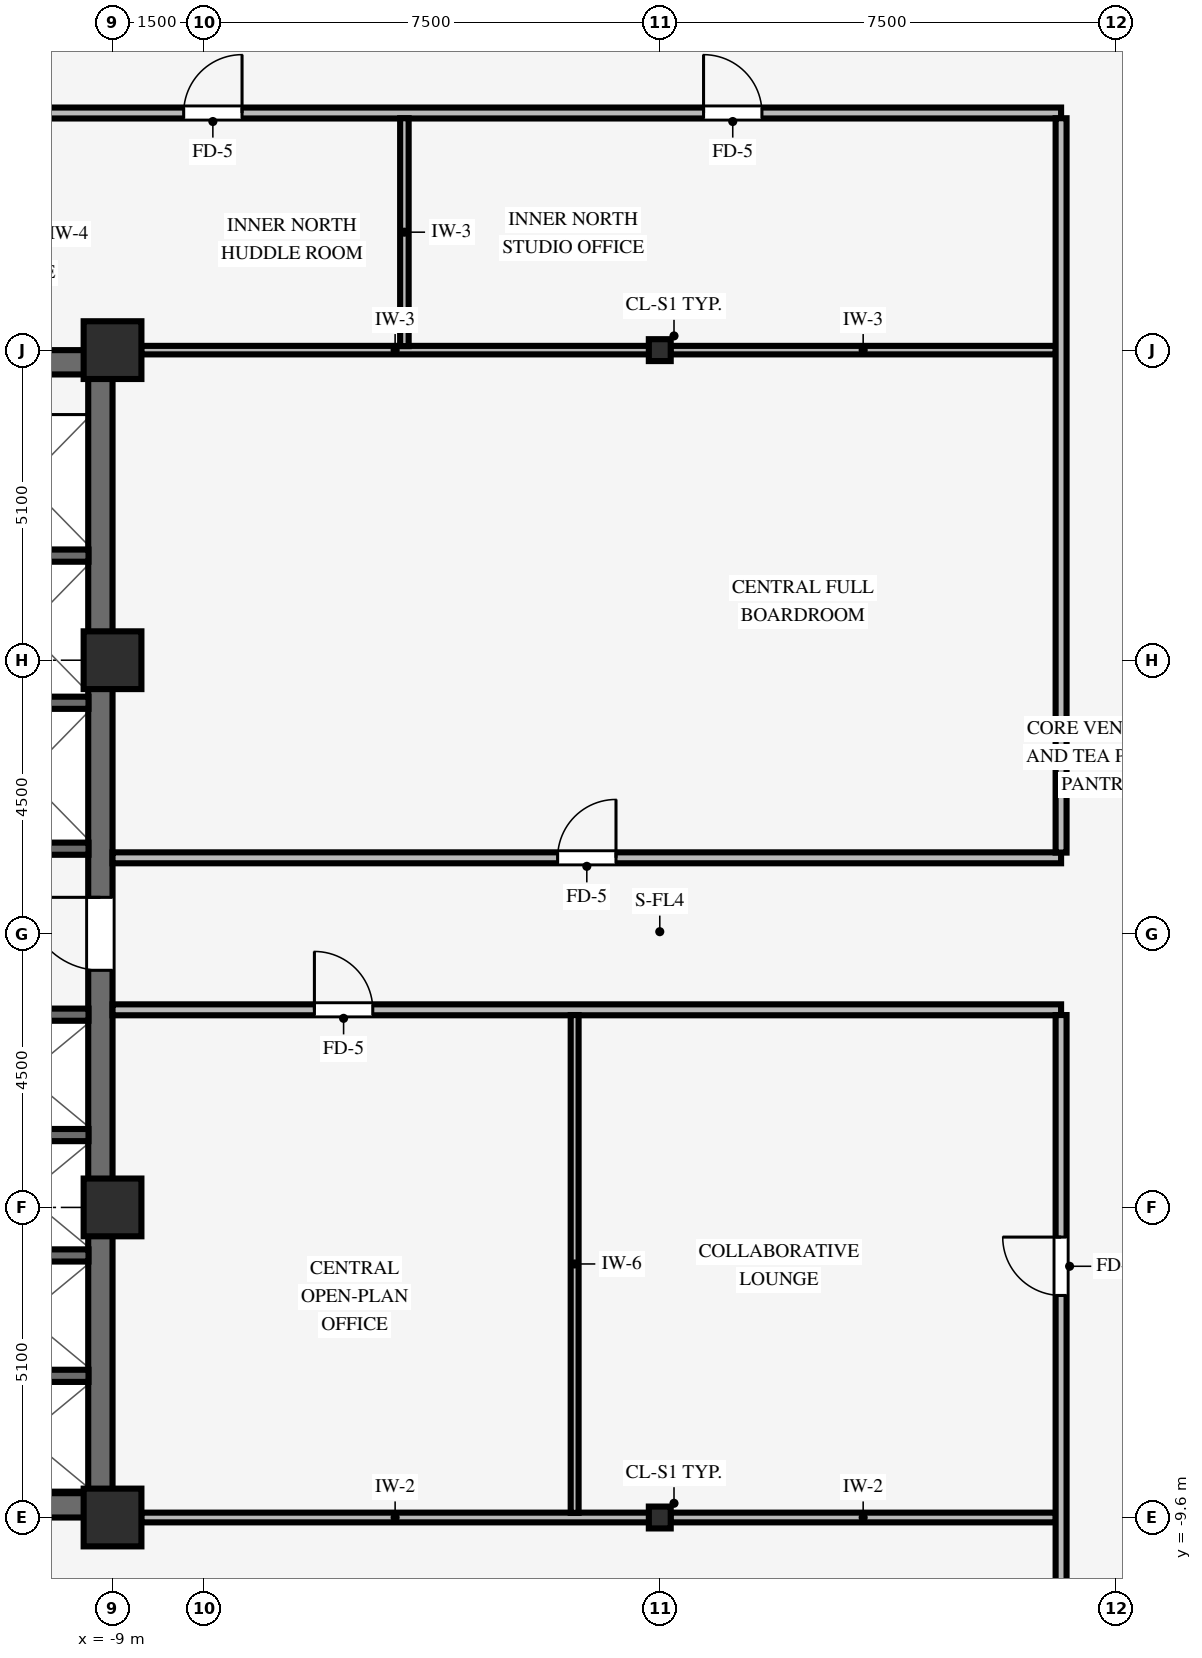
"""IFC4 building model, lengths in metres.
Left out: names, types, materials, properties, quantities, classifications, styles, units other than length and angle.
Written with IfcOpenShell. Run it as: python <this file> out.ifc"""

import sys

from ifc_helpers import new_model, si_unit, direction, frame, frame_2d, origin, origin_2d, place, context, subcontext, project, spatial, rectangle, i_section, extrude, source, transform, mapped, element, fill, save


model = new_model("IFC4")
c1 = context("Model", 3, precision=1e-05, world=origin(), true_north=direction((0.0, 1.0)))
c2 = subcontext(c1, "Body", "Model", "MODEL_VIEW")
j1 = project(units=[si_unit("LENGTHUNIT", "METRE"), si_unit("PLANEANGLEUNIT", "RADIAN")], contexts=[c1])
p1 = place(None, origin())
s1 = spatial("IfcSite", under=j1, at=p1, CompositionType="ELEMENT")
p2 = place(p1, origin())
s2 = spatial("IfcBuilding", under=s1, at=p2, CompositionType="ELEMENT")
p3 = place(p2, frame((0.0, 0.0, 123.85)))
s3 = spatial("IfcBuildingStorey", under=s2, at=p3, CompositionType="ELEMENT", Elevation=123.85)
for number, where, z_axis, x_axis in (
    (1, (-17.5, -9.4, 0.0), (0.0, 0.0, 1.0), (1.0, 0.0, 0.0)),
    (2, (-17.5, 9.4, 0.0), (0.0, 0.0, 1.0), (1.0, 0.0, 0.0)),
):
    element("IfcWall", number, at=place(p3, frame(where, z_axis=z_axis, x_axis=x_axis)), inside=s3, PredefinedType="SHEAR", context=c2, shape_type="SweptSolid", body=[
        extrude(rectangle(XDim=8.5, YDim=0.4, at=frame_2d((4.25, 0.0))), origin(), (0.0, 0.0, 1.0), 3.37),
    ])
p4 = place(p3, frame((-9.2, -9.205, 0.0), z_axis=(0.0, 0.0, 1.0), x_axis=(0.0, 1.0, 0.0)))
e3 = element("IfcWall", 3, at=p4, inside=s3, PredefinedType="SHEAR", context=c2, shape_type="SweptSolid", body=[
    extrude(rectangle(XDim=18.41, YDim=0.4, at=frame_2d((9.205, 0.0))), origin(), (0.0, 0.0, 1.0), 3.37),
])
p5 = place(p4, frame((8.605, 0.0, 0.0)))
e4 = element("IfcOpeningElement", 4, at=p5, cuts=e3, PredefinedType="OPENING", context=c2, shape_type="SweptSolid", body=[
    extrude(rectangle(XDim=1.2, YDim=2.15, at=frame_2d((0.6, 1.075))), frame((0.0, 0.21, 0.0), z_axis=(0.0, -1.0, 0.0), x_axis=(1.0, 0.0, 0.0)), (0.0, 0.0, 1.0), 0.42),
])
for number, where, z_axis, x_axis in (
    (5, (-9.0, -9.6, 0.0), (0.0, 0.0, 1.0), (1.0, 0.0, 0.0)),
    (6, (-9.0, -4.5, 0.0), (0.0, 0.0, 1.0), (1.0, 0.0, 0.0)),
    (7, (-9.0, 4.5, 0.0), (0.0, 0.0, 1.0), (1.0, 0.0, 0.0)),
    (8, (-9.0, 9.6, 0.0), (0.0, 0.0, 1.0), (1.0, 0.0, 0.0)),
):
    element("IfcColumn", number, at=place(p3, frame(where, z_axis=z_axis, x_axis=x_axis)), inside=s3, PredefinedType="COLUMN", context=c2, shape_type="SweptSolid", body=[
        extrude(rectangle(XDim=0.95, YDim=0.95, at=origin_2d()), origin(), (0.0, 0.0, 1.0), 3.37),
    ])
for number, where, z_axis, x_axis in (
    (9, (0.0, -9.6, 0.0), (0.0, 0.0, 1.0), (1.0, 0.0, 0.0)),
    (10, (0.0, 9.6, 0.0), (0.0, 0.0, 1.0), (1.0, 0.0, 0.0)),
):
    element("IfcColumn", number, at=place(p3, frame(where, z_axis=z_axis, x_axis=x_axis)), inside=s3, PredefinedType="COLUMN", context=c2, shape_type="SweptSolid", body=[
        extrude(i_section(OverallWidth=0.36, OverallDepth=0.36, WebThickness=0.021, FlangeThickness=0.021, FilletRadius=0.018, at=origin_2d()), origin(), (0.0, 0.0, 1.0), 3.37),
    ])
for number, where, z_axis, x_axis in (
    (11, (-11.505, -7.27, 0.0), (0.0, 0.0, 1.0), (1.0, 0.0, 0.0)),
    (12, (-11.505, -5.29, 0.0), (0.0, 0.0, 1.0), (1.0, 0.0, 0.0)),
    (13, (-11.505, -3.31, 0.0), (0.0, 0.0, 1.0), (1.0, 0.0, 0.0)),
    (14, (-11.505, -1.33, 0.0), (0.0, 0.0, 1.0), (1.0, 0.0, 0.0)),
    (15, (-11.505, 1.4, 0.0), (0.0, 0.0, 1.0), (1.0, 0.0, 0.0)),
    (16, (-11.505, 3.8, 0.0), (0.0, 0.0, 1.0), (1.0, 0.0, 0.0)),
    (17, (-11.505, 6.22, 0.0), (0.0, 0.0, 1.0), (1.0, 0.0, 0.0)),
):
    element("IfcWall", number, at=place(p3, frame(where, z_axis=z_axis, x_axis=x_axis)), inside=s3, PredefinedType="SHEAR", context=c2, shape_type="SweptSolid", body=[
        extrude(rectangle(XDim=2.11, YDim=0.2, at=frame_2d((1.055, 0.0))), origin(), (0.0, 0.0, 1.0), 3.37),
    ])
p6 = place(p3, frame((-8.529, -9.6, 0.0), z_axis=(0.0, 0.0, 1.0), x_axis=(1.0, 0.0, 0.0)))
e18 = element("IfcWall", 18, at=p6, inside=s3, PredefinedType="PARTITIONING", context=c2, shape_type="SweptSolid", body=[
    extrude(rectangle(XDim=8.353, YDim=0.16, at=frame_2d((4.177, 0.0))), origin(), (0.0, 0.0, 1.0), 2.405),
])
p7 = place(p3, frame((0.176, -9.6, 0.0), z_axis=(0.0, 0.0, 1.0), x_axis=(1.0, 0.0, 0.0)))
e19 = element("IfcWall", 19, at=p7, inside=s3, PredefinedType="PARTITIONING", context=c2, shape_type="SweptSolid", body=[
    extrude(rectangle(XDim=6.338, YDim=0.16, at=frame_2d((3.169, 0.0))), origin(), (0.0, 0.0, 1.0), 2.405),
])
p8 = place(p3, frame((-9.0, -1.25, 0.0), z_axis=(0.0, 0.0, 1.0), x_axis=(1.0, 0.0, 0.0)))
e20 = element("IfcWall", 20, at=p8, inside=s3, PredefinedType="PARTITIONING", context=c2, shape_type="SweptSolid", body=[
    extrude(rectangle(XDim=15.6, YDim=0.18, at=frame_2d((7.8, 0.0))), origin(), (0.0, 0.0, 1.0), 3.36),
])
p9 = place(p8, frame((3.32, 0.0, 0.0)))
e21 = element("IfcOpeningElement", 21, at=p9, cuts=e20, PredefinedType="OPENING", context=c2, shape_type="SweptSolid", body=[
    extrude(rectangle(XDim=0.96, YDim=2.1, at=frame_2d((0.48, 1.05))), frame((0.0, 0.1, 0.0), z_axis=(0.0, -1.0, 0.0), x_axis=(1.0, 0.0, 0.0)), (0.0, 0.0, 1.0), 0.2),
])
p10 = place(p3, frame((-9.0, 1.25, 0.0), z_axis=(0.0, 0.0, 1.0), x_axis=(1.0, 0.0, 0.0)))
e22 = element("IfcWall", 22, at=p10, inside=s3, PredefinedType="PARTITIONING", context=c2, shape_type="SweptSolid", body=[
    extrude(rectangle(XDim=15.6, YDim=0.18, at=frame_2d((7.8, 0.0))), origin(), (0.0, 0.0, 1.0), 3.36),
])
p11 = place(p10, frame((7.32, 0.0, 0.0)))
e23 = element("IfcOpeningElement", 23, at=p11, cuts=e22, PredefinedType="OPENING", context=c2, shape_type="SweptSolid", body=[
    extrude(rectangle(XDim=0.96, YDim=2.1, at=frame_2d((0.48, 1.05))), frame((0.0, 0.1, 0.0), z_axis=(0.0, -1.0, 0.0), x_axis=(1.0, 0.0, 0.0)), (0.0, 0.0, 1.0), 0.2),
])
p12 = place(p3, frame((-8.529, 9.6, 0.0), z_axis=(0.0, 0.0, 1.0), x_axis=(1.0, 0.0, 0.0)))
e24 = element("IfcWall", 24, at=p12, inside=s3, PredefinedType="PARTITIONING", context=c2, shape_type="SweptSolid", body=[
    extrude(rectangle(XDim=8.353, YDim=0.14, at=frame_2d((4.177, 0.0))), origin(), (0.0, 0.0, 1.0), 2.405),
])
p13 = place(p3, frame((0.176, 9.6, 0.0), z_axis=(0.0, 0.0, 1.0), x_axis=(1.0, 0.0, 0.0)))
e25 = element("IfcWall", 25, at=p13, inside=s3, PredefinedType="PARTITIONING", context=c2, shape_type="SweptSolid", body=[
    extrude(rectangle(XDim=6.338, YDim=0.14, at=frame_2d((3.169, 0.0))), origin(), (0.0, 0.0, 1.0), 2.405),
])
p14 = place(p3, frame((-17.7, 13.5, 0.0), z_axis=(0.0, 0.0, 1.0), x_axis=(1.0, 0.0, 0.0)))
e26 = element("IfcWall", 26, at=p14, inside=s3, PredefinedType="PARTITIONING", context=c2, shape_type="SweptSolid", body=[
    extrude(rectangle(XDim=24.3, YDim=0.18, at=frame_2d((12.15, 0.0))), origin(), (0.0, 0.0, 1.0), 2.998),
])
p15 = place(p14, frame((18.42, 0.0, 0.0)))
e27 = element("IfcOpeningElement", 27, at=p15, cuts=e26, PredefinedType="OPENING", context=c2, shape_type="SweptSolid", body=[
    extrude(rectangle(XDim=0.96, YDim=2.1, at=frame_2d((0.48, 1.05))), frame((0.0, 0.1, 0.0), z_axis=(0.0, -1.0, 0.0), x_axis=(1.0, 0.0, 0.0)), (0.0, 0.0, 1.0), 0.2),
])
p16 = place(p14, frame((9.87, 0.0, 0.0)))
e28 = element("IfcOpeningElement", 28, at=p16, cuts=e26, PredefinedType="OPENING", context=c2, shape_type="SweptSolid", body=[
    extrude(rectangle(XDim=0.96, YDim=2.1, at=frame_2d((0.48, 1.05))), frame((0.0, 0.1, 0.0), z_axis=(0.0, -1.0, 0.0), x_axis=(1.0, 0.0, 0.0)), (0.0, 0.0, 1.0), 0.2),
])
p17 = place(p14, frame((3.3, 0.0, 0.0)))
e29 = element("IfcOpeningElement", 29, at=p17, cuts=e26, PredefinedType="OPENING", context=c2, shape_type="SweptSolid", body=[
    extrude(rectangle(XDim=0.9, YDim=2.1, at=frame_2d((0.45, 1.05))), frame((0.0, 0.1, 0.0), z_axis=(0.0, -1.0, 0.0), x_axis=(1.0, 0.0, 0.0)), (0.0, 0.0, 1.0), 0.2),
])
p18 = place(p14, frame((5.65, 0.0, 0.0)))
e30 = element("IfcOpeningElement", 30, at=p18, cuts=e26, PredefinedType="OPENING", context=c2, shape_type="SweptSolid", body=[
    extrude(rectangle(XDim=0.9, YDim=2.1, at=frame_2d((0.45, 1.05))), frame((0.0, 0.1, 0.0), z_axis=(0.0, -1.0, 0.0), x_axis=(1.0, 0.0, 0.0)), (0.0, 0.0, 1.0), 0.2),
])
p19 = place(p3, frame((-4.2, 9.666, 0.0), z_axis=(0.0, 0.0, 1.0), x_axis=(0.0, 1.0, 0.0)))
e31 = element("IfcWall", 31, at=p19, inside=s3, PredefinedType="PARTITIONING", context=c2, shape_type="SweptSolid", body=[
    extrude(rectangle(XDim=3.748, YDim=0.14, at=frame_2d((1.874, 0.0))), origin(), (0.0, 0.0, 1.0), 3.36),
])
p20 = place(p3, frame((-1.4, -9.524, 0.0), z_axis=(0.0, 0.0, 1.0), x_axis=(0.0, 1.0, 0.0)))
e32 = element("IfcWall", 32, at=p20, inside=s3, PredefinedType="PARTITIONING", context=c2, shape_type="SweptSolid", body=[
    extrude(rectangle(XDim=8.188, YDim=0.13, at=frame_2d((4.094, 0.0))), origin(), (0.0, 0.0, 1.0), 3.36),
])
p21 = place(p3, frame((6.6, -13.414, 0.0), z_axis=(0.0, 0.0, 1.0), x_axis=(0.0, 1.0, 0.0)))
e33 = element("IfcWall", 33, at=p21, inside=s3, PredefinedType="PARTITIONING", context=c2, shape_type="SweptSolid", body=[
    extrude(rectangle(XDim=12.078, YDim=0.18, at=frame_2d((6.039, 0.0))), origin(), (0.0, 0.0, 1.0), 3.36),
])
p22 = place(p21, frame((7.466, 0.0, 0.0)))
e34 = element("IfcOpeningElement", 34, at=p22, cuts=e33, PredefinedType="OPENING", context=c2, shape_type="SweptSolid", body=[
    extrude(rectangle(XDim=0.96, YDim=2.1, at=frame_2d((0.48, 1.05))), frame((0.0, 0.1, 0.0), z_axis=(0.0, -1.0, 0.0), x_axis=(1.0, 0.0, 0.0)), (0.0, 0.0, 1.0), 0.2),
])
p23 = place(p3, frame((6.6, 1.336, 0.0), z_axis=(0.0, 0.0, 1.0), x_axis=(0.0, 1.0, 0.0)))
e35 = element("IfcWall", 35, at=p23, inside=s3, PredefinedType="PARTITIONING", context=c2, shape_type="SweptSolid", body=[
    extrude(rectangle(XDim=12.078, YDim=0.18, at=frame_2d((6.039, 0.0))), origin(), (0.0, 0.0, 1.0), 3.36),
])
m1 = source(origin(), c2, "Body", "SweptSolid", [
    extrude(rectangle(XDim=1.2, YDim=2.15, at=frame_2d((0.6, 1.075))), frame((0.0, 0.025, 0.0), z_axis=(0.0, -1.0, 0.0), x_axis=(1.0, 0.0, 0.0)), (0.0, 0.0, 1.0), 0.05),
])
p24 = place(p5, origin())
e36 = element("IfcDoor", 36, at=p24, inside=s3, OperationType="SINGLE_SWING_RIGHT", PredefinedType="DOOR", context=c2, shape_type="MappedRepresentation", body=[
    mapped(m1, transform((0.0, 0.0, 0.0), scale=1.0)),
])
fill(e4, e36)
m2 = source(origin(), c2, "Body", "SweptSolid", [
    extrude(rectangle(XDim=0.96, YDim=2.1, at=frame_2d((0.48, 1.05))), frame((0.0, 0.025, 0.0), z_axis=(0.0, -1.0, 0.0), x_axis=(1.0, 0.0, 0.0)), (0.0, 0.0, 1.0), 0.05),
])
p25 = place(p11, origin())
e37 = element("IfcDoor", 37, at=p25, inside=s3, OperationType="SINGLE_SWING_RIGHT", PredefinedType="DOOR", context=c2, shape_type="MappedRepresentation", body=[
    mapped(m2, transform((0.0, 0.0, 0.0), scale=1.0)),
])
fill(e23, e37)
p26 = place(p15, origin())
e38 = element("IfcDoor", 38, at=p26, inside=s3, OperationType="SINGLE_SWING_LEFT", PredefinedType="DOOR", context=c2, shape_type="MappedRepresentation", body=[
    mapped(m2, transform((0.0, 0.0, 0.0), scale=1.0)),
])
fill(e27, e38)
p27 = place(p22, origin())
e39 = element("IfcDoor", 39, at=p27, inside=s3, OperationType="SINGLE_SWING_RIGHT", PredefinedType="DOOR", context=c2, shape_type="MappedRepresentation", body=[
    mapped(m2, transform((0.0, 0.0, 0.0), scale=1.0)),
])
fill(e34, e39)
p28 = place(p9, origin())
e40 = element("IfcDoor", 40, at=p28, inside=s3, OperationType="SINGLE_SWING_LEFT", PredefinedType="DOOR", context=c2, shape_type="MappedRepresentation", body=[
    mapped(m2, transform((0.0, 0.0, 0.0), scale=1.0)),
])
fill(e21, e40)
p29 = place(p16, origin())
e41 = element("IfcDoor", 41, at=p29, inside=s3, OperationType="SINGLE_SWING_RIGHT", PredefinedType="DOOR", context=c2, shape_type="MappedRepresentation", body=[
    mapped(m2, transform((0.0, 0.0, 0.0), scale=1.0)),
])
fill(e28, e41)
save(model, sys.argv[1])
